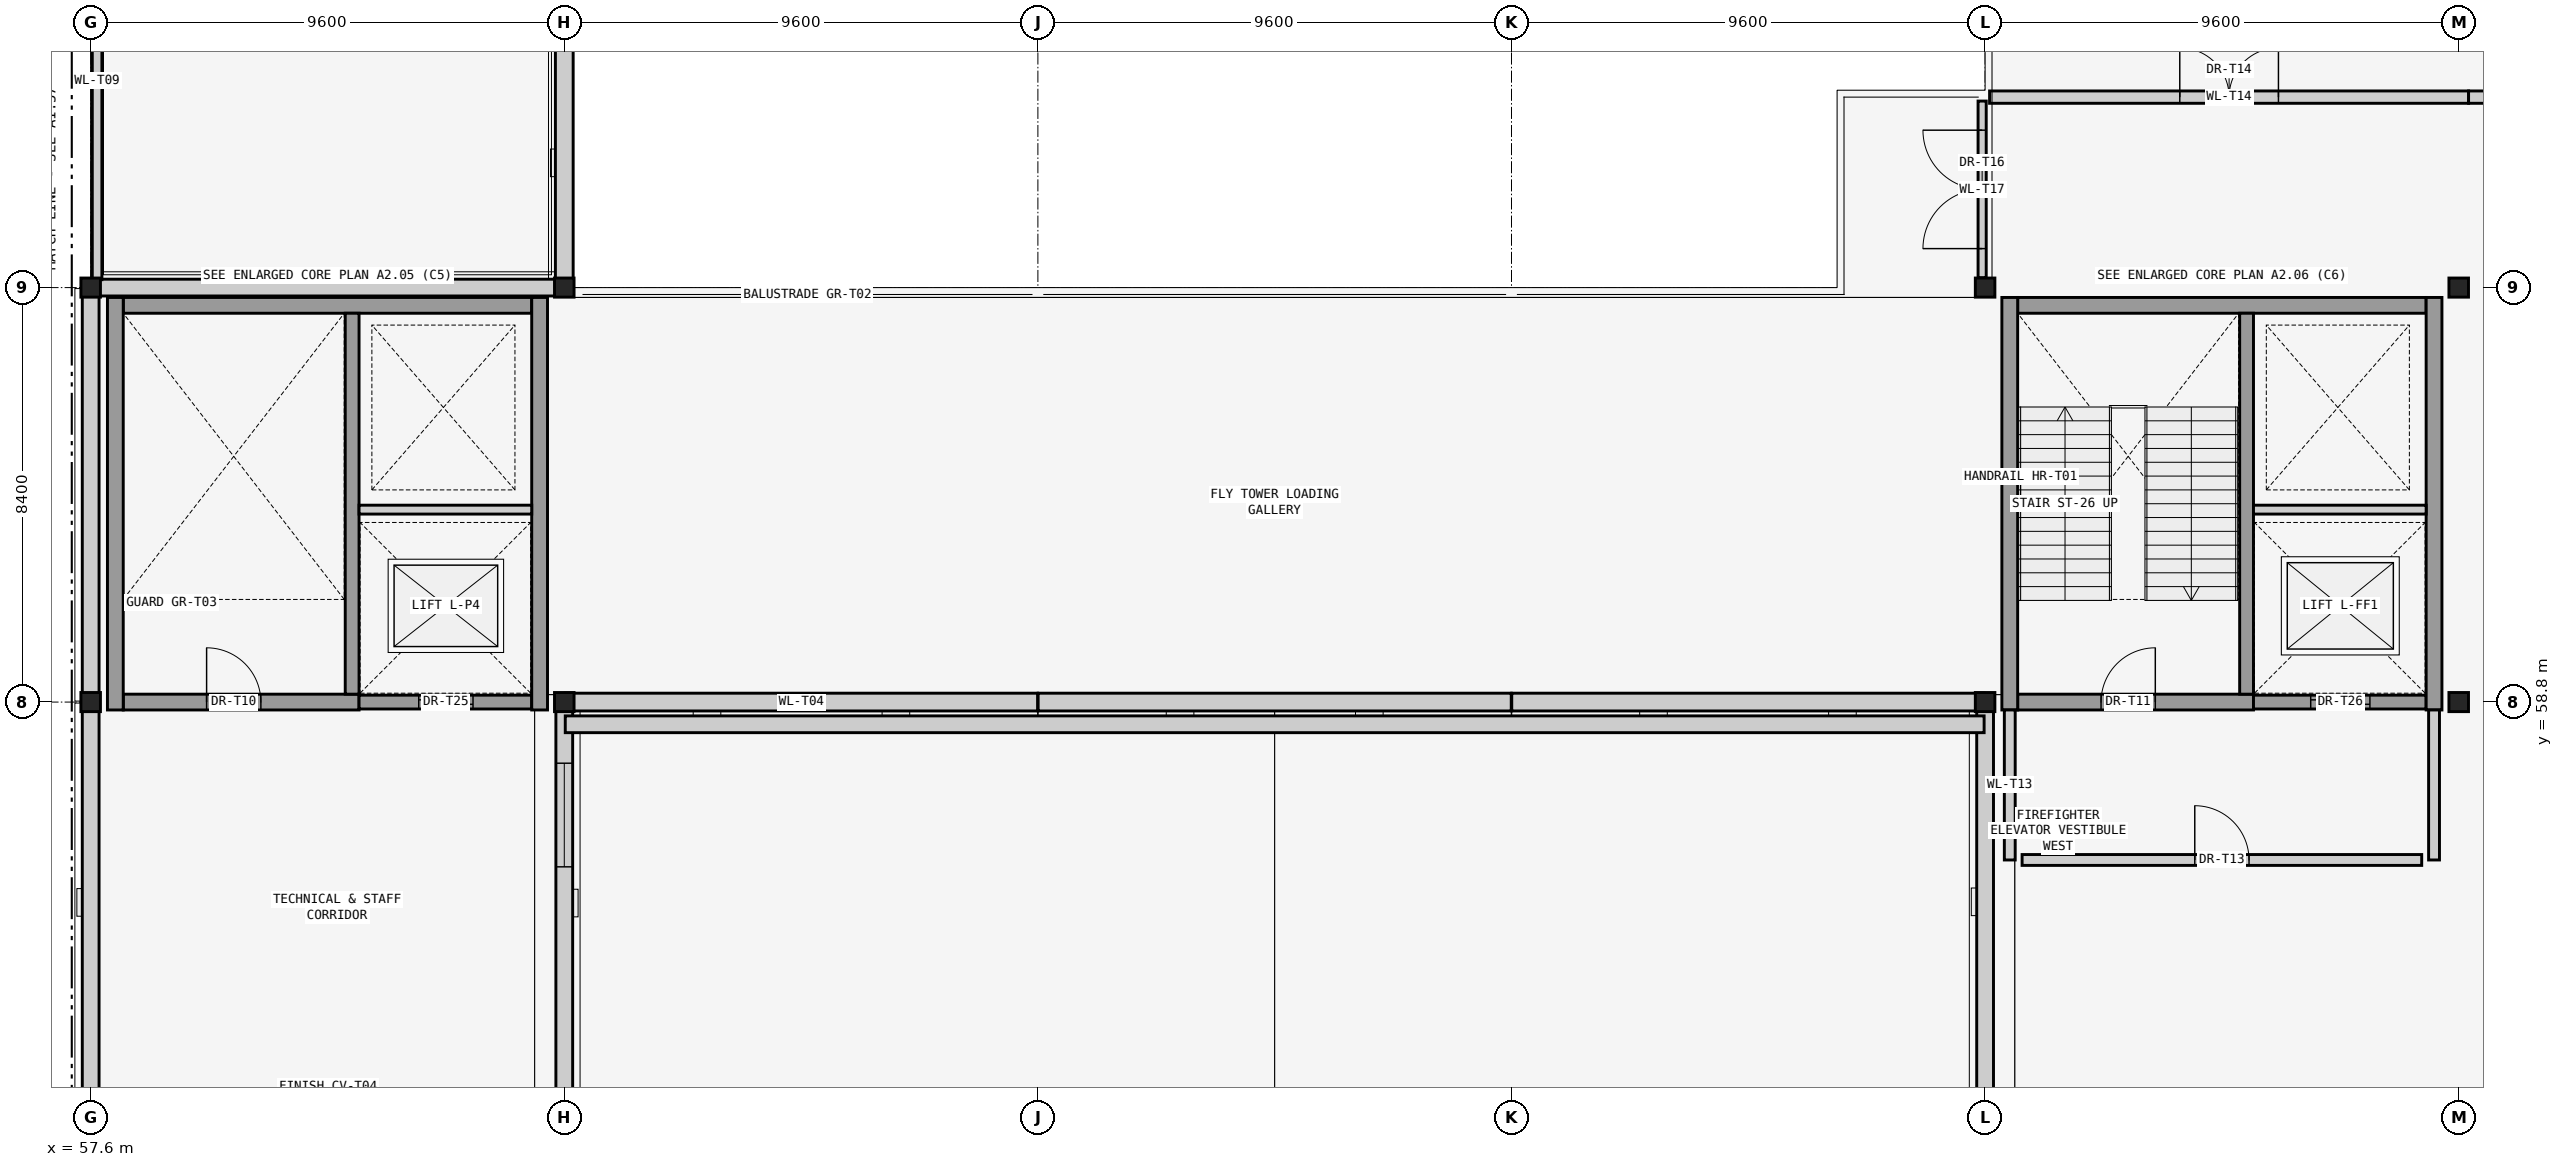
"""IFC4 building model, lengths in metres.
Left out: names, types, materials, properties, quantities, classifications, styles, units other than length and angle.
Written with IfcOpenShell. Run it as: python <this file> out.ifc"""

import sys

from ifc_helpers import new_model, si_unit, direction, frame, frame_2d, origin, origin_2d, place, context, subcontext, project, spatial, polyline, rectangle, i_section, outline, extrude, element, fill, save


model = new_model("IFC4")
c1 = context("Model", 3, precision=1e-05, world=origin(), true_north=direction((0.0, 1.0)))
c2 = subcontext(c1, "Body", "Model", "MODEL_VIEW")
j1 = project(units=[si_unit("LENGTHUNIT", "METRE"), si_unit("PLANEANGLEUNIT", "RADIAN")], contexts=[c1])
p1 = place(None, origin())
s1 = spatial("IfcSite", under=j1, at=p1, CompositionType="ELEMENT")
p2 = place(p1, origin())
s2 = spatial("IfcBuilding", under=s1, at=p2, CompositionType="ELEMENT")
p3 = place(p2, frame((0.0, 0.0, 19.8)))
s3 = spatial("IfcBuildingStorey", under=s2, at=p3, CompositionType="ELEMENT", Elevation=19.8)
for number, where, z_axis, x_axis in (
    (1, (57.6, 58.8, 0.0), (0.0, 0.0, 1.0), (1.0, 0.0, 0.0)),
    (2, (57.6, 67.2, 0.0), (0.0, 0.0, 1.0), (1.0, 0.0, 0.0)),
    (3, (67.2, 58.8, 0.0), (0.0, 0.0, 1.0), (1.0, 0.0, 0.0)),
    (4, (67.2, 67.2, 0.0), (0.0, 0.0, 1.0), (1.0, 0.0, 0.0)),
):
    element("IfcColumn", number, at=place(p3, frame(where, z_axis=z_axis, x_axis=x_axis)), inside=s3, PredefinedType="COLUMN", context=c2, shape_type="SweptSolid", body=[
        extrude(i_section(OverallWidth=0.396, OverallDepth=0.387, WebThickness=0.025, FlangeThickness=0.038, at=origin_2d()), origin(), (0.0, 0.0, 1.0), 4.53),
    ])
for number, where, z_axis, x_axis in (
    (5, (96.0, 58.8, 0.0), (0.0, 0.0, 1.0), (1.0, 0.0, 0.0)),
    (6, (96.0, 67.2, 0.0), (0.0, 0.0, 1.0), (1.0, 0.0, 0.0)),
    (7, (105.6, 58.8, 0.0), (0.0, 0.0, 1.0), (1.0, 0.0, 0.0)),
    (8, (105.6, 67.2, 0.0), (0.0, 0.0, 1.0), (1.0, 0.0, 0.0)),
):
    element("IfcColumn", number, at=place(p3, frame(where, z_axis=z_axis, x_axis=x_axis)), inside=s3, PredefinedType="COLUMN", context=c2, shape_type="SweptSolid", body=[
        extrude(i_section(OverallWidth=0.396, OverallDepth=0.387, WebThickness=0.025, FlangeThickness=0.038, at=origin_2d()), origin(), (0.0, 0.0, 1.0), 4.6),
    ])
p4 = place(p3, frame((57.6, 50.7, 0.0), z_axis=(0.0, 0.0, 1.0), x_axis=(0.0, 1.0, 0.0)))
e9 = element("IfcWall", 9, at=p4, inside=s3, PredefinedType="SOLIDWALL", context=c2, shape_type="SweptSolid", body=[
    extrude(rectangle(XDim=8.08, YDim=0.34, at=frame_2d((4.04, 0.0))), origin(), (0.0, 0.0, 1.0), 4.58),
])
p5 = place(p3, frame((67.2, 58.78, 0.0), z_axis=(0.0, 0.0, 1.0), x_axis=(0.0, -1.0, 0.0)))
e10 = element("IfcWall", 10, at=p5, inside=s3, PredefinedType="SOLIDWALL", context=c2, shape_type="SweptSolid", body=[
    extrude(rectangle(XDim=8.105, YDim=0.34, at=frame_2d((4.052, 0.0))), origin(), (0.0, 0.0, 1.0), 4.58),
])
p6 = place(p5, frame((1.219, 0.0, 0.9)))
e11 = element("IfcOpeningElement", 11, at=p6, cuts=e10, PredefinedType="OPENING", context=c2, shape_type="SweptSolid", body=[
    extrude(rectangle(XDim=2.1, YDim=2.4, at=frame_2d((1.05, 1.2))), frame((0.0, 0.18, 0.0), z_axis=(0.0, -1.0, 0.0), x_axis=(1.0, 0.0, 0.0)), (0.0, 0.0, 1.0), 0.36),
])
p7 = place(p3, frame((57.62, 67.2, 0.0), z_axis=(0.0, 0.0, 1.0), x_axis=(1.0, 0.0, 0.0)))
e12 = element("IfcWall", 12, at=p7, inside=s3, PredefinedType="SOLIDWALL", context=c2, shape_type="SweptSolid", body=[
    extrude(rectangle(XDim=9.56, YDim=0.34, at=frame_2d((4.78, 0.0))), origin(), (0.0, 0.0, 1.0), 3.729),
])
p8 = place(p3, frame((57.6, 58.82, 0.0), z_axis=(0.0, 0.0, 1.0), x_axis=(0.0, 1.0, 0.0)))
e13 = element("IfcWall", 13, at=p8, inside=s3, PredefinedType="SOLIDWALL", context=c2, shape_type="SweptSolid", body=[
    extrude(rectangle(XDim=8.36, YDim=0.34, at=frame_2d((4.18, 0.0))), origin(), (0.0, 0.0, 1.0), 4.58),
])
p9 = place(p3, frame((76.795, 58.8, 0.0), z_axis=(0.0, 0.0, 1.0), x_axis=(-1.0, 0.0, 0.0)))
e14 = element("IfcWall", 14, at=p9, inside=s3, PredefinedType="SOLIDWALL", context=c2, shape_type="SweptSolid", body=[
    extrude(rectangle(XDim=9.575, YDim=0.36, at=frame_2d((4.788, 0.0))), origin(), (0.0, 0.0, 1.0), 3.576),
])
p10 = place(p3, frame((67.2, 67.22, 0.0), z_axis=(0.0, 0.0, 1.0), x_axis=(0.0, 1.0, 0.0)))
e15 = element("IfcWall", 15, at=p10, inside=s3, PredefinedType="SOLIDWALL", context=c2, shape_type="SweptSolid", body=[
    extrude(rectangle(XDim=8.36, YDim=0.36, at=frame_2d((4.18, 0.0))), origin(), (0.0, 0.0, 1.0), 4.58),
])
p11 = place(p3, frame((86.395, 58.8, 0.0), z_axis=(0.0, 0.0, 1.0), x_axis=(-1.0, 0.0, 0.0)))
e16 = element("IfcWall", 16, at=p11, inside=s3, PredefinedType="SOLIDWALL", context=c2, shape_type="SweptSolid", body=[
    extrude(rectangle(XDim=9.59, YDim=0.36, at=frame_2d((4.795, 0.0))), origin(), (0.0, 0.0, 1.0), 3.576),
])
p12 = place(p3, frame((95.98, 58.8, 0.0), z_axis=(0.0, 0.0, 1.0), x_axis=(-1.0, 0.0, 0.0)))
e17 = element("IfcWall", 17, at=p12, inside=s3, PredefinedType="SOLIDWALL", context=c2, shape_type="SweptSolid", body=[
    extrude(rectangle(XDim=9.575, YDim=0.36, at=frame_2d((4.788, 0.0))), origin(), (0.0, 0.0, 1.0), 3.576),
])
p13 = place(p3, frame((96.0, 50.725, 0.0), z_axis=(0.0, 0.0, 1.0), x_axis=(0.0, 1.0, 0.0)))
e18 = element("IfcWall", 18, at=p13, inside=s3, PredefinedType="SOLIDWALL", context=c2, shape_type="SweptSolid", body=[
    extrude(rectangle(XDim=8.055, YDim=0.34, at=frame_2d((4.027, 0.0))), origin(), (0.0, 0.0, 1.0), 4.58),
])
p14 = place(p3, frame((95.98, 58.35, 4.85), z_axis=(0.0, 0.0, 1.0), x_axis=(-1.0, 0.0, 0.0)))
e19 = element("IfcWall", 19, at=p14, inside=s3, PredefinedType="SOLIDWALL", context=c2, shape_type="SweptSolid", body=[
    extrude(outline(polyline([(0.0, 0.0), (28.76, 0.0), (28.76, 0.75), (14.38, 7.07), (0.0, 0.75), (0.0, 0.0)])), frame((0.0, 0.17, 0.0), z_axis=(0.0, -1.0, 0.0), x_axis=(1.0, 0.0, 0.0)), (0.0, 0.0, 1.0), 0.34),
])
p15 = place(p3, frame((57.73, 67.36, 0.0), z_axis=(0.0, 0.0, 1.0), x_axis=(0.0, 1.0, 0.0)))
e20 = element("IfcWall", 20, at=p15, inside=s3, PredefinedType="PARAPET", context=c2, shape_type="SweptSolid", body=[
    extrude(rectangle(XDim=8.08, YDim=0.195, at=frame_2d((4.04, 0.0))), origin(), (0.0, 0.0, 1.0), 1.15),
])
p16 = place(p3, frame((58.26, 58.8, 0.0), z_axis=(0.0, 0.0, 1.0), x_axis=(1.0, 0.0, 0.0)))
e21 = element("IfcWall", 21, at=p16, inside=s3, PredefinedType="SHEAR", context=c2, shape_type="SweptSolid", body=[
    extrude(rectangle(XDim=4.78, YDim=0.32, at=frame_2d((2.39, 0.0))), origin(), (0.0, 0.0, 1.0), 4.58),
])
p17 = place(p16, frame((1.69, 0.0, 0.0)))
e22 = element("IfcOpeningElement", 22, at=p17, cuts=e21, PredefinedType="OPENING", context=c2, shape_type="SweptSolid", body=[
    extrude(rectangle(XDim=1.1, YDim=2.2, at=frame_2d((0.55, 1.1))), frame((0.0, 0.17, 0.0), z_axis=(0.0, -1.0, 0.0), x_axis=(1.0, 0.0, 0.0)), (0.0, 0.0, 1.0), 0.34),
])
p18 = place(p3, frame((63.04, 58.8, 0.0), z_axis=(0.0, 0.0, 1.0), x_axis=(1.0, 0.0, 0.0)))
e23 = element("IfcWall", 23, at=p18, inside=s3, PredefinedType="SHEAR", context=c2, shape_type="SweptSolid", body=[
    extrude(rectangle(XDim=3.5, YDim=0.28, at=frame_2d((1.75, 0.0))), origin(), (0.0, 0.0, 1.0), 4.58),
])
p19 = place(p18, frame((1.21, 0.0, 0.0)))
e24 = element("IfcOpeningElement", 24, at=p19, cuts=e23, PredefinedType="OPENING", context=c2, shape_type="SweptSolid", body=[
    extrude(rectangle(XDim=1.1, YDim=2.2, at=frame_2d((0.55, 1.1))), frame((0.0, 0.15, 0.0), z_axis=(0.0, -1.0, 0.0), x_axis=(1.0, 0.0, 0.0)), (0.0, 0.0, 1.0), 0.3),
])
p20 = place(p3, frame((66.54, 66.84, 0.0), z_axis=(0.0, 0.0, 1.0), x_axis=(-1.0, 0.0, 0.0)))
e25 = element("IfcWall", 25, at=p20, inside=s3, PredefinedType="SHEAR", context=c2, shape_type="SweptSolid", body=[
    extrude(rectangle(XDim=8.28, YDim=0.32, at=frame_2d((4.14, 0.0))), origin(), (0.0, 0.0, 1.0), 4.58),
])
for number, where, z_axis, x_axis in (
    (26, (58.1, 67.0, 0.0), (0.0, 0.0, 1.0), (0.0, -1.0, 0.0)),
    (27, (66.7, 58.64, 0.0), (0.0, 0.0, 1.0), (0.0, 1.0, 0.0)),
):
    element("IfcWall", number, at=place(p3, frame(where, z_axis=z_axis, x_axis=x_axis)), inside=s3, PredefinedType="SHEAR", context=c2, shape_type="SweptSolid", body=[
        extrude(rectangle(XDim=8.36, YDim=0.32, at=frame_2d((4.18, 0.0))), origin(), (0.0, 0.0, 1.0), 4.58),
    ])
p21 = place(p3, frame((62.9, 58.96, 0.0), z_axis=(0.0, 0.0, 1.0), x_axis=(0.0, 1.0, 0.0)))
e28 = element("IfcWall", 28, at=p21, inside=s3, PredefinedType="SHEAR", context=c2, shape_type="SweptSolid", body=[
    extrude(rectangle(XDim=7.72, YDim=0.28, at=frame_2d((3.86, 0.0))), origin(), (0.0, 0.0, 1.0), 4.58),
])
p22 = place(p3, frame((63.04, 62.7, 0.0), z_axis=(0.0, 0.0, 1.0), x_axis=(1.0, 0.0, 0.0)))
e29 = element("IfcWall", 29, at=p22, inside=s3, PredefinedType="SOLIDWALL", context=c2, shape_type="SweptSolid", body=[
    extrude(rectangle(XDim=3.5, YDim=0.18, at=frame_2d((1.75, 0.0))), origin(), (0.0, 0.0, 1.0), 4.58),
])
p23 = place(p3, frame((96.66, 58.8, 0.0), z_axis=(0.0, 0.0, 1.0), x_axis=(1.0, 0.0, 0.0)))
e30 = element("IfcWall", 30, at=p23, inside=s3, PredefinedType="SHEAR", context=c2, shape_type="SweptSolid", body=[
    extrude(rectangle(XDim=4.78, YDim=0.32, at=frame_2d((2.39, 0.0))), origin(), (0.0, 0.0, 1.0), 4.58),
])
p24 = place(p23, frame((1.69, 0.0, 0.0)))
e31 = element("IfcOpeningElement", 31, at=p24, cuts=e30, PredefinedType="OPENING", context=c2, shape_type="SweptSolid", body=[
    extrude(rectangle(XDim=1.1, YDim=2.2, at=frame_2d((0.55, 1.1))), frame((0.0, 0.17, 0.0), z_axis=(0.0, -1.0, 0.0), x_axis=(1.0, 0.0, 0.0)), (0.0, 0.0, 1.0), 0.34),
])
p25 = place(p3, frame((101.44, 58.8, 0.0), z_axis=(0.0, 0.0, 1.0), x_axis=(1.0, 0.0, 0.0)))
e32 = element("IfcWall", 32, at=p25, inside=s3, PredefinedType="SHEAR", context=c2, shape_type="SweptSolid", body=[
    extrude(rectangle(XDim=3.5, YDim=0.28, at=frame_2d((1.75, 0.0))), origin(), (0.0, 0.0, 1.0), 4.58),
])
p26 = place(p25, frame((1.16, 0.0, 0.0)))
e33 = element("IfcOpeningElement", 33, at=p26, cuts=e32, PredefinedType="OPENING", context=c2, shape_type="SweptSolid", body=[
    extrude(rectangle(XDim=1.2, YDim=2.2, at=frame_2d((0.6, 1.1))), frame((0.0, 0.15, 0.0), z_axis=(0.0, -1.0, 0.0), x_axis=(1.0, 0.0, 0.0)), (0.0, 0.0, 1.0), 0.3),
])
p27 = place(p3, frame((104.94, 66.84, 0.0), z_axis=(0.0, 0.0, 1.0), x_axis=(-1.0, 0.0, 0.0)))
e34 = element("IfcWall", 34, at=p27, inside=s3, PredefinedType="SHEAR", context=c2, shape_type="SweptSolid", body=[
    extrude(rectangle(XDim=8.28, YDim=0.32, at=frame_2d((4.14, 0.0))), origin(), (0.0, 0.0, 1.0), 4.58),
])
for number, where, z_axis, x_axis in (
    (35, (96.5, 67.0, 0.0), (0.0, 0.0, 1.0), (0.0, -1.0, 0.0)),
    (36, (105.1, 58.64, 0.0), (0.0, 0.0, 1.0), (0.0, 1.0, 0.0)),
):
    element("IfcWall", number, at=place(p3, frame(where, z_axis=z_axis, x_axis=x_axis)), inside=s3, PredefinedType="SHEAR", context=c2, shape_type="SweptSolid", body=[
        extrude(rectangle(XDim=8.36, YDim=0.32, at=frame_2d((4.18, 0.0))), origin(), (0.0, 0.0, 1.0), 4.58),
    ])
p28 = place(p3, frame((101.3, 58.96, 0.0), z_axis=(0.0, 0.0, 1.0), x_axis=(0.0, 1.0, 0.0)))
e37 = element("IfcWall", 37, at=p28, inside=s3, PredefinedType="SHEAR", context=c2, shape_type="SweptSolid", body=[
    extrude(rectangle(XDim=7.72, YDim=0.28, at=frame_2d((3.86, 0.0))), origin(), (0.0, 0.0, 1.0), 4.58),
])
p29 = place(p3, frame((101.44, 62.7, 0.0), z_axis=(0.0, 0.0, 1.0), x_axis=(1.0, 0.0, 0.0)))
e38 = element("IfcWall", 38, at=p29, inside=s3, PredefinedType="SOLIDWALL", context=c2, shape_type="SweptSolid", body=[
    extrude(rectangle(XDim=3.5, YDim=0.18, at=frame_2d((1.75, 0.0))), origin(), (0.0, 0.0, 1.0), 4.58),
])
for number, where, z_axis, x_axis in (
    (39, (96.5, 55.6, 0.0), (0.0, 0.0, 1.0), (0.0, 1.0, 0.0)),
    (40, (105.1, 55.6, 0.0), (0.0, 0.0, 1.0), (0.0, 1.0, 0.0)),
):
    element("IfcWall", number, at=place(p3, frame(where, z_axis=z_axis, x_axis=x_axis)), inside=s3, PredefinedType="SOLIDWALL", context=c2, shape_type="SweptSolid", body=[
        extrude(rectangle(XDim=3.04, YDim=0.22, at=frame_2d((1.52, 0.0))), origin(), (0.0, 0.0, 1.0), 4.32),
    ])
p30 = place(p3, frame((96.75, 55.6, 0.0), z_axis=(0.0, 0.0, 1.0), x_axis=(1.0, 0.0, 0.0)))
e41 = element("IfcWall", 41, at=p30, inside=s3, PredefinedType="SOLIDWALL", context=c2, shape_type="SweptSolid", body=[
    extrude(rectangle(XDim=8.1, YDim=0.22, at=frame_2d((4.05, 0.0))), origin(), (0.0, 0.0, 1.0), 4.32),
])
p31 = place(p30, frame((3.5, 0.0, 0.0)))
e42 = element("IfcOpeningElement", 42, at=p31, cuts=e41, PredefinedType="OPENING", context=c2, shape_type="SweptSolid", body=[
    extrude(rectangle(XDim=1.1, YDim=2.2, at=frame_2d((0.55, 1.1))), frame((0.0, 0.12, 0.0), z_axis=(0.0, -1.0, 0.0), x_axis=(1.0, 0.0, 0.0)), (0.0, 0.0, 1.0), 0.24),
])
p32 = place(p3, frame((95.94, 67.4, 0.0), z_axis=(0.0, 0.0, 1.0), x_axis=(0.0, 1.0, 0.0)))
e43 = element("IfcWall", 43, at=p32, inside=s3, PredefinedType="PARTITIONING", context=c2, shape_type="SweptSolid", body=[
    extrude(rectangle(XDim=3.58, YDim=0.165, at=frame_2d((1.79, 0.0))), origin(), (0.0, 0.0, 1.0), 3.877),
])
p33 = place(p32, frame((0.59, 0.0, 0.0)))
e44 = element("IfcOpeningElement", 44, at=p33, cuts=e43, PredefinedType="OPENING", context=c2, shape_type="SweptSolid", body=[
    extrude(rectangle(XDim=2.4, YDim=2.8, at=frame_2d((1.2, 1.4))), frame((0.0, 0.093, 0.0), z_axis=(0.0, -1.0, 0.0), x_axis=(1.0, 0.0, 0.0)), (0.0, 0.0, 1.0), 0.185),
])
p34 = place(p3, frame((96.091, 71.06, 0.0), z_axis=(0.0, 0.0, 1.0), x_axis=(1.0, 0.0, 0.0)))
e45 = element("IfcWall", 45, at=p34, inside=s3, PredefinedType="SOLIDWALL", context=c2, shape_type="SweptSolid", body=[
    extrude(rectangle(XDim=9.709, YDim=0.25, at=frame_2d((4.854, 0.0))), origin(), (0.0, 0.0, 1.0), 4.55),
])
p35 = place(p34, frame((3.855, 0.0, 0.0)))
e46 = element("IfcOpeningElement", 46, at=p35, cuts=e45, PredefinedType="OPENING", context=c2, shape_type="SweptSolid", body=[
    extrude(rectangle(XDim=2.0, YDim=2.4, at=frame_2d((1.0, 1.2))), frame((0.0, 0.135, 0.0), z_axis=(0.0, -1.0, 0.0), x_axis=(1.0, 0.0, 0.0)), (0.0, 0.0, 1.0), 0.27),
])
p36 = place(p3, frame((105.8, 71.06, 0.0), z_axis=(0.0, 0.0, 1.0), x_axis=(1.0, 0.0, 0.0)))
e47 = element("IfcWall", 47, at=p36, inside=s3, PredefinedType="SOLIDWALL", context=c2, shape_type="SweptSolid", body=[
    extrude(rectangle(XDim=3.6, YDim=0.25, at=frame_2d((1.8, 0.0))), origin(), (0.0, 0.0, 1.0), 4.55),
])
p37 = place(p6, origin())
e48 = element("IfcWindow", 48, at=p37, inside=s3, PartitioningType="SINGLE_PANEL", PredefinedType="WINDOW", context=c2, shape_type="SweptSolid", body=[
    extrude(rectangle(XDim=2.1, YDim=2.4, at=frame_2d((1.05, 1.2))), frame((0.0, 0.03, 0.0), z_axis=(0.0, -1.0, 0.0), x_axis=(1.0, 0.0, 0.0)), (0.0, 0.0, 1.0), 0.06),
])
fill(e11, e48)
p38 = place(p17, origin())
e49 = element("IfcDoor", 49, at=p38, inside=s3, OperationType="SINGLE_SWING_LEFT", PredefinedType="DOOR", context=c2, shape_type="SweptSolid", body=[
    extrude(rectangle(XDim=1.1, YDim=2.2, at=frame_2d((0.55, 1.1))), frame((0.0, 0.025, 0.0), z_axis=(0.0, -1.0, 0.0), x_axis=(1.0, 0.0, 0.0)), (0.0, 0.0, 1.0), 0.05),
])
fill(e22, e49)
p39 = place(p19, origin())
e50 = element("IfcDoor", 50, at=p39, inside=s3, OperationType="SLIDING_TO_LEFT", PredefinedType="DOOR", context=c2, shape_type="SweptSolid", body=[
    extrude(rectangle(XDim=1.1, YDim=2.2, at=frame_2d((0.55, 1.1))), frame((0.0, 0.025, 0.0), z_axis=(0.0, -1.0, 0.0), x_axis=(1.0, 0.0, 0.0)), (0.0, 0.0, 1.0), 0.05),
])
fill(e24, e50)
p40 = place(p24, origin())
e51 = element("IfcDoor", 51, at=p40, inside=s3, OperationType="SINGLE_SWING_RIGHT", PredefinedType="DOOR", context=c2, shape_type="SweptSolid", body=[
    extrude(rectangle(XDim=1.1, YDim=2.2, at=frame_2d((0.55, 1.1))), frame((0.0, 0.025, 0.0), z_axis=(0.0, -1.0, 0.0), x_axis=(1.0, 0.0, 0.0)), (0.0, 0.0, 1.0), 0.05),
])
fill(e31, e51)
p41 = place(p26, origin())
e52 = element("IfcDoor", 52, at=p41, inside=s3, OperationType="SLIDING_TO_RIGHT", PredefinedType="DOOR", context=c2, shape_type="SweptSolid", body=[
    extrude(rectangle(XDim=1.2, YDim=2.2, at=frame_2d((0.6, 1.1))), frame((0.0, 0.025, 0.0), z_axis=(0.0, -1.0, 0.0), x_axis=(1.0, 0.0, 0.0)), (0.0, 0.0, 1.0), 0.05),
])
fill(e33, e52)
p42 = place(p31, origin())
e53 = element("IfcDoor", 53, at=p42, inside=s3, OperationType="SINGLE_SWING_LEFT", PredefinedType="DOOR", context=c2, shape_type="SweptSolid", body=[
    extrude(rectangle(XDim=1.1, YDim=2.2, at=frame_2d((0.55, 1.1))), frame((0.0, 0.025, 0.0), z_axis=(0.0, -1.0, 0.0), x_axis=(1.0, 0.0, 0.0)), (0.0, 0.0, 1.0), 0.05),
])
fill(e42, e53)
p43 = place(p33, origin())
e54 = element("IfcDoor", 54, at=p43, inside=s3, OperationType="DOUBLE_SWING_LEFT", PredefinedType="DOOR", context=c2, shape_type="SweptSolid", body=[
    extrude(rectangle(XDim=2.4, YDim=2.8, at=frame_2d((1.2, 1.4))), frame((0.0, 0.025, 0.0), z_axis=(0.0, -1.0, 0.0), x_axis=(1.0, 0.0, 0.0)), (0.0, 0.0, 1.0), 0.05),
])
fill(e44, e54)
p44 = place(p35, origin())
e55 = element("IfcDoor", 55, at=p44, inside=s3, OperationType="DOUBLE_SWING_LEFT", PredefinedType="DOOR", context=c2, shape_type="SweptSolid", body=[
    extrude(rectangle(XDim=2.0, YDim=2.4, at=frame_2d((1.0, 1.2))), frame((0.0, 0.025, 0.0), z_axis=(0.0, -1.0, 0.0), x_axis=(1.0, 0.0, 0.0)), (0.0, 0.0, 1.0), 0.05),
])
fill(e46, e55)
save(model, sys.argv[1])
